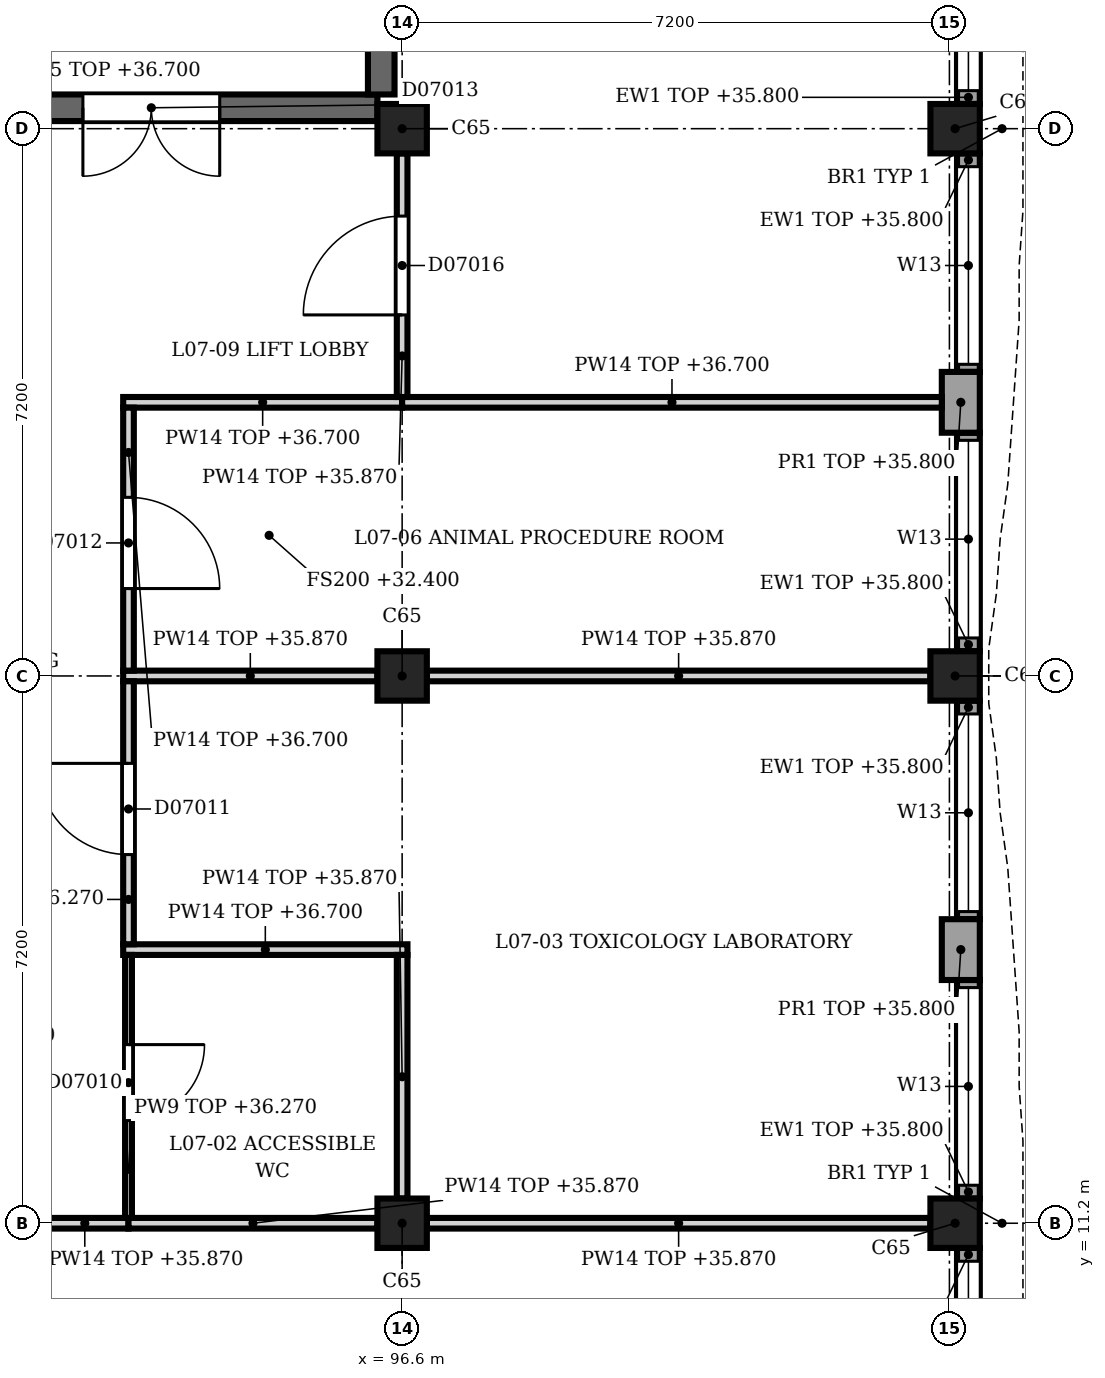
"""IFC4 building model, lengths in metres.
Left out: names, types, materials, properties, quantities, classifications, styles, units other than length and angle.
Written with IfcOpenShell. Run it as: python <this file> out.ifc"""

import sys

from ifc_helpers import new_model, si_unit, direction, frame, frame_2d, origin, origin_2d, place, context, subcontext, project, spatial, rectangle, extrude, element, fill, save


model = new_model("IFC4")
c1 = context("Model", 3, precision=1e-05, world=origin(), true_north=direction((0.0, 1.0)))
c2 = subcontext(c1, "Body", "Model", "MODEL_VIEW")
j1 = project(units=[si_unit("LENGTHUNIT", "METRE"), si_unit("PLANEANGLEUNIT", "RADIAN")], contexts=[c1])
p1 = place(None, origin())
s1 = spatial("IfcSite", under=j1, at=p1, CompositionType="ELEMENT")
p2 = place(p1, origin())
s2 = spatial("IfcBuilding", under=s1, at=p2, CompositionType="ELEMENT")
p3 = place(p2, frame((0.0, 0.0, 32.4)))
s3 = spatial("IfcBuildingStorey", under=s2, at=p3, CompositionType="ELEMENT", Elevation=32.4)
for number, where, z_axis, x_axis in (
    (1, (96.6, 11.2, 0.0), (0.0, 0.0, 1.0), (1.0, 0.0, 0.0)),
    (2, (96.6, 18.4, 0.0), (0.0, 0.0, 1.0), (1.0, 0.0, 0.0)),
    (3, (96.6, 25.6, 0.0), (0.0, 0.0, 1.0), (1.0, 0.0, 0.0)),
    (4, (103.875, 11.2, 0.0), (0.0, 0.0, 1.0), (1.0, 0.0, 0.0)),
    (5, (103.875, 18.4, 0.0), (0.0, 0.0, 1.0), (1.0, 0.0, 0.0)),
    (6, (103.875, 25.6, 0.0), (0.0, 0.0, 1.0), (1.0, 0.0, 0.0)),
):
    element("IfcColumn", number, at=place(p3, frame(where, z_axis=z_axis, x_axis=x_axis)), inside=s3, PredefinedType="COLUMN", context=c2, shape_type="SweptSolid", body=[
        extrude(rectangle(XDim=0.65, YDim=0.65, at=origin_2d()), origin(), (0.0, 0.0, 1.0), 4.5),
    ])
p4 = place(p3, frame((103.95, 22.4, 0.0), z_axis=(0.0, 0.0, 1.0), x_axis=(0.0, -1.0, 0.0)))
e7 = element("IfcWall", 7, at=p4, inside=s3, PredefinedType="SOLIDWALL", context=c2, shape_type="SweptSolid", body=[
    extrude(rectangle(XDim=0.8, YDim=0.5, at=frame_2d((0.4, 0.0))), origin(), (0.0, 0.0, 1.0), 3.4),
])
p5 = place(p3, frame((103.95, 15.2, 0.0), z_axis=(0.0, 0.0, 1.0), x_axis=(0.0, -1.0, 0.0)))
e8 = element("IfcWall", 8, at=p5, inside=s3, PredefinedType="SOLIDWALL", context=c2, shape_type="SweptSolid", body=[
    extrude(rectangle(XDim=0.8, YDim=0.5, at=frame_2d((0.4, 0.0))), origin(), (0.0, 0.0, 1.0), 3.4),
])
p6 = place(p3, frame((104.05, 28.8, 0.0), z_axis=(0.0, 0.0, 1.0), x_axis=(0.0, -1.0, 0.0)))
e9 = element("IfcWall", 9, at=p6, inside=s3, PredefinedType="SOLIDWALL", context=c2, shape_type="SweptSolid", body=[
    extrude(rectangle(XDim=2.875, YDim=0.3, at=frame_2d((1.438, 0.0))), origin(), (0.0, 0.0, 1.0), 3.4),
])
p7 = place(p6, frame((0.1, 0.0, 0.9)))
e10 = element("IfcOpeningElement", 10, at=p7, cuts=e9, PredefinedType="OPENING", context=c2, shape_type="SweptSolid", body=[
    extrude(rectangle(XDim=2.6, YDim=2.2, at=frame_2d((1.3, 1.1))), frame((0.0, 0.16, 0.0), z_axis=(0.0, -1.0, 0.0), x_axis=(1.0, 0.0, 0.0)), (0.0, 0.0, 1.0), 0.32),
])
p8 = place(p3, frame((104.05, 25.275, 0.0), z_axis=(0.0, 0.0, 1.0), x_axis=(0.0, -1.0, 0.0)))
e11 = element("IfcWall", 11, at=p8, inside=s3, PredefinedType="SOLIDWALL", context=c2, shape_type="SweptSolid", body=[
    extrude(rectangle(XDim=2.875, YDim=0.3, at=frame_2d((1.438, 0.0))), origin(), (0.0, 0.0, 1.0), 3.4),
])
p9 = place(p8, frame((0.175, 0.0, 0.9)))
e12 = element("IfcOpeningElement", 12, at=p9, cuts=e11, PredefinedType="OPENING", context=c2, shape_type="SweptSolid", body=[
    extrude(rectangle(XDim=2.6, YDim=2.2, at=frame_2d((1.3, 1.1))), frame((0.0, 0.16, 0.0), z_axis=(0.0, -1.0, 0.0), x_axis=(1.0, 0.0, 0.0)), (0.0, 0.0, 1.0), 0.32),
])
p10 = place(p3, frame((104.05, 21.6, 0.0), z_axis=(0.0, 0.0, 1.0), x_axis=(0.0, -1.0, 0.0)))
e13 = element("IfcWall", 13, at=p10, inside=s3, PredefinedType="SOLIDWALL", context=c2, shape_type="SweptSolid", body=[
    extrude(rectangle(XDim=2.875, YDim=0.3, at=frame_2d((1.438, 0.0))), origin(), (0.0, 0.0, 1.0), 3.4),
])
p11 = place(p10, frame((0.1, 0.0, 0.9)))
e14 = element("IfcOpeningElement", 14, at=p11, cuts=e13, PredefinedType="OPENING", context=c2, shape_type="SweptSolid", body=[
    extrude(rectangle(XDim=2.6, YDim=2.2, at=frame_2d((1.3, 1.1))), frame((0.0, 0.16, 0.0), z_axis=(0.0, -1.0, 0.0), x_axis=(1.0, 0.0, 0.0)), (0.0, 0.0, 1.0), 0.32),
])
p12 = place(p3, frame((104.05, 18.075, 0.0), z_axis=(0.0, 0.0, 1.0), x_axis=(0.0, -1.0, 0.0)))
e15 = element("IfcWall", 15, at=p12, inside=s3, PredefinedType="SOLIDWALL", context=c2, shape_type="SweptSolid", body=[
    extrude(rectangle(XDim=2.875, YDim=0.3, at=frame_2d((1.438, 0.0))), origin(), (0.0, 0.0, 1.0), 3.4),
])
p13 = place(p12, frame((0.175, 0.0, 0.9)))
e16 = element("IfcOpeningElement", 16, at=p13, cuts=e15, PredefinedType="OPENING", context=c2, shape_type="SweptSolid", body=[
    extrude(rectangle(XDim=2.6, YDim=2.2, at=frame_2d((1.3, 1.1))), frame((0.0, 0.16, 0.0), z_axis=(0.0, -1.0, 0.0), x_axis=(1.0, 0.0, 0.0)), (0.0, 0.0, 1.0), 0.32),
])
p14 = place(p3, frame((104.05, 14.4, 0.0), z_axis=(0.0, 0.0, 1.0), x_axis=(0.0, -1.0, 0.0)))
e17 = element("IfcWall", 17, at=p14, inside=s3, PredefinedType="SOLIDWALL", context=c2, shape_type="SweptSolid", body=[
    extrude(rectangle(XDim=2.875, YDim=0.3, at=frame_2d((1.438, 0.0))), origin(), (0.0, 0.0, 1.0), 3.4),
])
p15 = place(p14, frame((0.1, 0.0, 0.9)))
e18 = element("IfcOpeningElement", 18, at=p15, cuts=e17, PredefinedType="OPENING", context=c2, shape_type="SweptSolid", body=[
    extrude(rectangle(XDim=2.6, YDim=2.2, at=frame_2d((1.3, 1.1))), frame((0.0, 0.16, 0.0), z_axis=(0.0, -1.0, 0.0), x_axis=(1.0, 0.0, 0.0)), (0.0, 0.0, 1.0), 0.32),
])
p16 = place(p3, frame((104.05, 10.875, 0.0), z_axis=(0.0, 0.0, 1.0), x_axis=(0.0, -1.0, 0.0)))
e19 = element("IfcWall", 19, at=p16, inside=s3, PredefinedType="SOLIDWALL", context=c2, shape_type="SweptSolid", body=[
    extrude(rectangle(XDim=2.875, YDim=0.3, at=frame_2d((1.438, 0.0))), origin(), (0.0, 0.0, 1.0), 3.4),
])
p17 = place(p16, frame((0.175, 0.0, 0.9)))
e20 = element("IfcOpeningElement", 20, at=p17, cuts=e19, PredefinedType="OPENING", context=c2, shape_type="SweptSolid", body=[
    extrude(rectangle(XDim=2.6, YDim=2.2, at=frame_2d((1.3, 1.1))), frame((0.0, 0.16, 0.0), z_axis=(0.0, -1.0, 0.0), x_axis=(1.0, 0.0, 0.0)), (0.0, 0.0, 1.0), 0.32),
])
p18 = place(p3, frame((89.725, 25.875, 0.0), z_axis=(0.0, 0.0, 1.0), x_axis=(1.0, 0.0, 0.0)))
e21 = element("IfcWall", 21, at=p18, inside=s3, PredefinedType="SHEAR", context=c2, shape_type="SweptSolid", body=[
    extrude(rectangle(XDim=6.55, YDim=0.35, at=frame_2d((3.275, 0.0))), origin(), (0.0, 0.0, 1.0), 4.3),
])
p19 = place(p18, frame((2.675, 0.0, 0.0)))
e22 = element("IfcOpeningElement", 22, at=p19, cuts=e21, PredefinedType="OPENING", context=c2, shape_type="SweptSolid", body=[
    extrude(rectangle(XDim=1.8, YDim=2.1, at=frame_2d((0.9, 1.05))), frame((0.0, 0.185, 0.0), z_axis=(0.0, -1.0, 0.0), x_axis=(1.0, 0.0, 0.0)), (0.0, 0.0, 1.0), 0.37),
])
p20 = place(p3, frame((96.325, 26.05, 0.0), z_axis=(0.0, 0.0, 1.0), x_axis=(0.0, 1.0, 0.0)))
e23 = element("IfcWall", 23, at=p20, inside=s3, PredefinedType="SHEAR", context=c2, shape_type="SweptSolid", body=[
    extrude(rectangle(XDim=6.3, YDim=0.35, at=frame_2d((3.15, 0.0))), origin(), (0.0, 0.0, 1.0), 4.3),
])
p21 = place(p3, frame((93.0, 11.2, 0.0), z_axis=(0.0, 0.0, 1.0), x_axis=(-1.0, 0.0, 0.0)))
e24 = element("IfcWall", 24, at=p21, inside=s3, PredefinedType="PARTITIONING", context=c2, shape_type="SweptSolid", body=[
    extrude(rectangle(XDim=3.275, YDim=0.14, at=frame_2d((1.637, 0.0))), origin(), (0.0, 0.0, 1.0), 3.47),
])
p22 = place(p21, frame((1.15, 0.0, 0.0)))
e25 = element("IfcOpeningElement", 25, at=p22, cuts=e24, PredefinedType="OPENING", context=c2, shape_type="SweptSolid", body=[
    extrude(rectangle(XDim=1.2, YDim=2.1, at=frame_2d((0.6, 1.05))), frame((0.0, 0.08, 0.0), z_axis=(0.0, -1.0, 0.0), x_axis=(1.0, 0.0, 0.0)), (0.0, 0.0, 1.0), 0.16),
])
p23 = place(p3, frame((93.0, 11.2, 0.0), z_axis=(0.0, 0.0, 1.0), x_axis=(1.0, 0.0, 0.0)))
e26 = element("IfcWall", 26, at=p23, inside=s3, PredefinedType="PARTITIONING", context=c2, shape_type="SweptSolid", body=[
    extrude(rectangle(XDim=3.275, YDim=0.14, at=frame_2d((1.637, 0.0))), origin(), (0.0, 0.0, 1.0), 3.47),
])
p24 = place(p3, frame((96.925, 11.2, 0.0), z_axis=(0.0, 0.0, 1.0), x_axis=(1.0, 0.0, 0.0)))
e27 = element("IfcWall", 27, at=p24, inside=s3, PredefinedType="PARTITIONING", context=c2, shape_type="SweptSolid", body=[
    extrude(rectangle(XDim=6.625, YDim=0.14, at=frame_2d((3.312, 0.0))), origin(), (0.0, 0.0, 1.0), 3.47),
])
p25 = place(p3, frame((92.93, 14.8, 0.0), z_axis=(0.0, 0.0, 1.0), x_axis=(1.0, 0.0, 0.0)))
e28 = element("IfcWall", 28, at=p25, inside=s3, PredefinedType="PARTITIONING", context=c2, shape_type="SweptSolid", body=[
    extrude(rectangle(XDim=3.74, YDim=0.14, at=frame_2d((1.87, 0.0))), origin(), (0.0, 0.0, 1.0), 4.3),
])
p26 = place(p3, frame((92.93, 18.4, 0.0), z_axis=(0.0, 0.0, 1.0), x_axis=(1.0, 0.0, 0.0)))
e29 = element("IfcWall", 29, at=p26, inside=s3, PredefinedType="PARTITIONING", context=c2, shape_type="SweptSolid", body=[
    extrude(rectangle(XDim=3.345, YDim=0.14, at=frame_2d((1.672, 0.0))), origin(), (0.0, 0.0, 1.0), 3.47),
])
p27 = place(p3, frame((96.925, 18.4, 0.0), z_axis=(0.0, 0.0, 1.0), x_axis=(1.0, 0.0, 0.0)))
e30 = element("IfcWall", 30, at=p27, inside=s3, PredefinedType="PARTITIONING", context=c2, shape_type="SweptSolid", body=[
    extrude(rectangle(XDim=6.625, YDim=0.14, at=frame_2d((3.312, 0.0))), origin(), (0.0, 0.0, 1.0), 3.47),
])
p28 = place(p3, frame((92.93, 22.0, 0.0), z_axis=(0.0, 0.0, 1.0), x_axis=(1.0, 0.0, 0.0)))
e31 = element("IfcWall", 31, at=p28, inside=s3, PredefinedType="PARTITIONING", context=c2, shape_type="SweptSolid", body=[
    extrude(rectangle(XDim=3.67, YDim=0.14, at=frame_2d((1.835, 0.0))), origin(), (0.0, 0.0, 1.0), 4.3),
])
p29 = place(p3, frame((96.6, 22.0, 0.0), z_axis=(0.0, 0.0, 1.0), x_axis=(1.0, 0.0, 0.0)))
e32 = element("IfcWall", 32, at=p29, inside=s3, PredefinedType="PARTITIONING", context=c2, shape_type="SweptSolid", body=[
    extrude(rectangle(XDim=7.1, YDim=0.14, at=frame_2d((3.55, 0.0))), origin(), (0.0, 0.0, 1.0), 4.3),
])
p30 = place(p3, frame((93.0, 14.73, 0.0), z_axis=(0.0, 0.0, 1.0), x_axis=(0.0, -1.0, 0.0)))
e33 = element("IfcWall", 33, at=p30, inside=s3, PredefinedType="PARTITIONING", context=c2, shape_type="SweptSolid", body=[
    extrude(rectangle(XDim=3.46, YDim=0.09, at=frame_2d((1.73, 0.0))), origin(), (0.0, 0.0, 1.0), 3.87),
])
p31 = place(p30, frame((1.18, 0.0, 0.0)))
e34 = element("IfcOpeningElement", 34, at=p31, cuts=e33, PredefinedType="OPENING", context=c2, shape_type="SweptSolid", body=[
    extrude(rectangle(XDim=1.0, YDim=2.2, at=frame_2d((0.5, 1.1))), frame((0.0, 0.055, 0.0), z_axis=(0.0, -1.0, 0.0), x_axis=(1.0, 0.0, 0.0)), (0.0, 0.0, 1.0), 0.11),
])
p32 = place(p3, frame((93.0, 18.33, 0.0), z_axis=(0.0, 0.0, 1.0), x_axis=(0.0, -1.0, 0.0)))
e35 = element("IfcWall", 35, at=p32, inside=s3, PredefinedType="PARTITIONING", context=c2, shape_type="SweptSolid", body=[
    extrude(rectangle(XDim=3.46, YDim=0.14, at=frame_2d((1.73, 0.0))), origin(), (0.0, 0.0, 1.0), 3.87),
])
p33 = place(p32, frame((1.08, 0.0, 0.0)))
e36 = element("IfcOpeningElement", 36, at=p33, cuts=e35, PredefinedType="OPENING", context=c2, shape_type="SweptSolid", body=[
    extrude(rectangle(XDim=1.2, YDim=2.2, at=frame_2d((0.6, 1.1))), frame((0.0, 0.08, 0.0), z_axis=(0.0, -1.0, 0.0), x_axis=(1.0, 0.0, 0.0)), (0.0, 0.0, 1.0), 0.16),
])
p34 = place(p3, frame((93.0, 21.93, 0.0), z_axis=(0.0, 0.0, 1.0), x_axis=(0.0, -1.0, 0.0)))
e37 = element("IfcWall", 37, at=p34, inside=s3, PredefinedType="PARTITIONING", context=c2, shape_type="SweptSolid", body=[
    extrude(rectangle(XDim=3.46, YDim=0.14, at=frame_2d((1.73, 0.0))), origin(), (0.0, 0.0, 1.0), 4.3),
])
p35 = place(p34, frame((1.18, 0.0, 0.0)))
e38 = element("IfcOpeningElement", 38, at=p35, cuts=e37, PredefinedType="OPENING", context=c2, shape_type="SweptSolid", body=[
    extrude(rectangle(XDim=1.2, YDim=2.2, at=frame_2d((0.6, 1.1))), frame((0.0, 0.08, 0.0), z_axis=(0.0, -1.0, 0.0), x_axis=(1.0, 0.0, 0.0)), (0.0, 0.0, 1.0), 0.16),
])
p36 = place(p3, frame((96.6, 11.525, 0.0), z_axis=(0.0, 0.0, 1.0), x_axis=(0.0, 1.0, 0.0)))
e39 = element("IfcWall", 39, at=p36, inside=s3, PredefinedType="PARTITIONING", context=c2, shape_type="SweptSolid", body=[
    extrude(rectangle(XDim=3.205, YDim=0.14, at=frame_2d((1.603, 0.0))), origin(), (0.0, 0.0, 1.0), 3.47),
])
p37 = place(p3, frame((96.6, 25.275, 0.0), z_axis=(0.0, 0.0, 1.0), x_axis=(0.0, -1.0, 0.0)))
e40 = element("IfcWall", 40, at=p37, inside=s3, PredefinedType="PARTITIONING", context=c2, shape_type="SweptSolid", body=[
    extrude(rectangle(XDim=3.205, YDim=0.14, at=frame_2d((1.603, 0.0))), origin(), (0.0, 0.0, 1.0), 3.47),
])
p38 = place(p37, frame((0.825, 0.0, 0.0)))
e41 = element("IfcOpeningElement", 41, at=p38, cuts=e40, PredefinedType="OPENING", context=c2, shape_type="SweptSolid", body=[
    extrude(rectangle(XDim=1.3, YDim=2.2, at=frame_2d((0.65, 1.1))), frame((0.0, 0.08, 0.0), z_axis=(0.0, -1.0, 0.0), x_axis=(1.0, 0.0, 0.0)), (0.0, 0.0, 1.0), 0.16),
])
p39 = place(p7, origin())
e42 = element("IfcWindow", 42, at=p39, inside=s3, PartitioningType="SINGLE_PANEL", PredefinedType="WINDOW", context=c2, shape_type="SweptSolid", body=[
    extrude(rectangle(XDim=2.6, YDim=2.2, at=frame_2d((1.3, 1.1))), frame((0.0, 0.03, 0.0), z_axis=(0.0, -1.0, 0.0), x_axis=(1.0, 0.0, 0.0)), (0.0, 0.0, 1.0), 0.06),
])
fill(e10, e42)
p40 = place(p9, origin())
e43 = element("IfcWindow", 43, at=p40, inside=s3, PartitioningType="SINGLE_PANEL", PredefinedType="WINDOW", context=c2, shape_type="SweptSolid", body=[
    extrude(rectangle(XDim=2.6, YDim=2.2, at=frame_2d((1.3, 1.1))), frame((0.0, 0.03, 0.0), z_axis=(0.0, -1.0, 0.0), x_axis=(1.0, 0.0, 0.0)), (0.0, 0.0, 1.0), 0.06),
])
fill(e12, e43)
p41 = place(p11, origin())
e44 = element("IfcWindow", 44, at=p41, inside=s3, PartitioningType="SINGLE_PANEL", PredefinedType="WINDOW", context=c2, shape_type="SweptSolid", body=[
    extrude(rectangle(XDim=2.6, YDim=2.2, at=frame_2d((1.3, 1.1))), frame((0.0, 0.03, 0.0), z_axis=(0.0, -1.0, 0.0), x_axis=(1.0, 0.0, 0.0)), (0.0, 0.0, 1.0), 0.06),
])
fill(e14, e44)
p42 = place(p13, origin())
e45 = element("IfcWindow", 45, at=p42, inside=s3, PartitioningType="SINGLE_PANEL", PredefinedType="WINDOW", context=c2, shape_type="SweptSolid", body=[
    extrude(rectangle(XDim=2.6, YDim=2.2, at=frame_2d((1.3, 1.1))), frame((0.0, 0.03, 0.0), z_axis=(0.0, -1.0, 0.0), x_axis=(1.0, 0.0, 0.0)), (0.0, 0.0, 1.0), 0.06),
])
fill(e16, e45)
p43 = place(p15, origin())
e46 = element("IfcWindow", 46, at=p43, inside=s3, PartitioningType="SINGLE_PANEL", PredefinedType="WINDOW", context=c2, shape_type="SweptSolid", body=[
    extrude(rectangle(XDim=2.6, YDim=2.2, at=frame_2d((1.3, 1.1))), frame((0.0, 0.03, 0.0), z_axis=(0.0, -1.0, 0.0), x_axis=(1.0, 0.0, 0.0)), (0.0, 0.0, 1.0), 0.06),
])
fill(e18, e46)
p44 = place(p17, origin())
e47 = element("IfcWindow", 47, at=p44, inside=s3, PartitioningType="SINGLE_PANEL", PredefinedType="WINDOW", context=c2, shape_type="SweptSolid", body=[
    extrude(rectangle(XDim=2.6, YDim=2.2, at=frame_2d((1.3, 1.1))), frame((0.0, 0.03, 0.0), z_axis=(0.0, -1.0, 0.0), x_axis=(1.0, 0.0, 0.0)), (0.0, 0.0, 1.0), 0.06),
])
fill(e20, e47)
p45 = place(p19, origin())
e48 = element("IfcDoor", 48, at=p45, inside=s3, OperationType="SINGLE_SWING_LEFT", PredefinedType="DOOR", context=c2, shape_type="SweptSolid", body=[
    extrude(rectangle(XDim=1.8, YDim=2.1, at=frame_2d((0.9, 1.05))), frame((0.0, 0.025, 0.0), z_axis=(0.0, -1.0, 0.0), x_axis=(1.0, 0.0, 0.0)), (0.0, 0.0, 1.0), 0.05),
])
fill(e22, e48)
p46 = place(p31, origin())
e49 = element("IfcDoor", 49, at=p46, inside=s3, OperationType="SINGLE_SWING_LEFT", PredefinedType="DOOR", context=c2, shape_type="SweptSolid", body=[
    extrude(rectangle(XDim=1.0, YDim=2.2, at=frame_2d((0.5, 1.1))), frame((0.0, 0.025, 0.0), z_axis=(0.0, -1.0, 0.0), x_axis=(1.0, 0.0, 0.0)), (0.0, 0.0, 1.0), 0.05),
])
fill(e34, e49)
p47 = place(p33, origin())
e50 = element("IfcDoor", 50, at=p47, inside=s3, OperationType="SINGLE_SWING_LEFT", PredefinedType="DOOR", context=c2, shape_type="SweptSolid", body=[
    extrude(rectangle(XDim=1.2, YDim=2.2, at=frame_2d((0.6, 1.1))), frame((0.0, 0.025, 0.0), z_axis=(0.0, -1.0, 0.0), x_axis=(1.0, 0.0, 0.0)), (0.0, 0.0, 1.0), 0.05),
])
fill(e36, e50)
p48 = place(p35, origin())
e51 = element("IfcDoor", 51, at=p48, inside=s3, OperationType="SINGLE_SWING_RIGHT", PredefinedType="DOOR", context=c2, shape_type="SweptSolid", body=[
    extrude(rectangle(XDim=1.2, YDim=2.2, at=frame_2d((0.6, 1.1))), frame((0.0, 0.025, 0.0), z_axis=(0.0, -1.0, 0.0), x_axis=(1.0, 0.0, 0.0)), (0.0, 0.0, 1.0), 0.05),
])
fill(e38, e51)
p49 = place(p38, origin())
e52 = element("IfcDoor", 52, at=p49, inside=s3, OperationType="SINGLE_SWING_LEFT", PredefinedType="DOOR", context=c2, shape_type="SweptSolid", body=[
    extrude(rectangle(XDim=1.3, YDim=2.2, at=frame_2d((0.65, 1.1))), frame((0.0, 0.025, 0.0), z_axis=(0.0, -1.0, 0.0), x_axis=(1.0, 0.0, 0.0)), (0.0, 0.0, 1.0), 0.05),
])
fill(e41, e52)
save(model, sys.argv[1])
